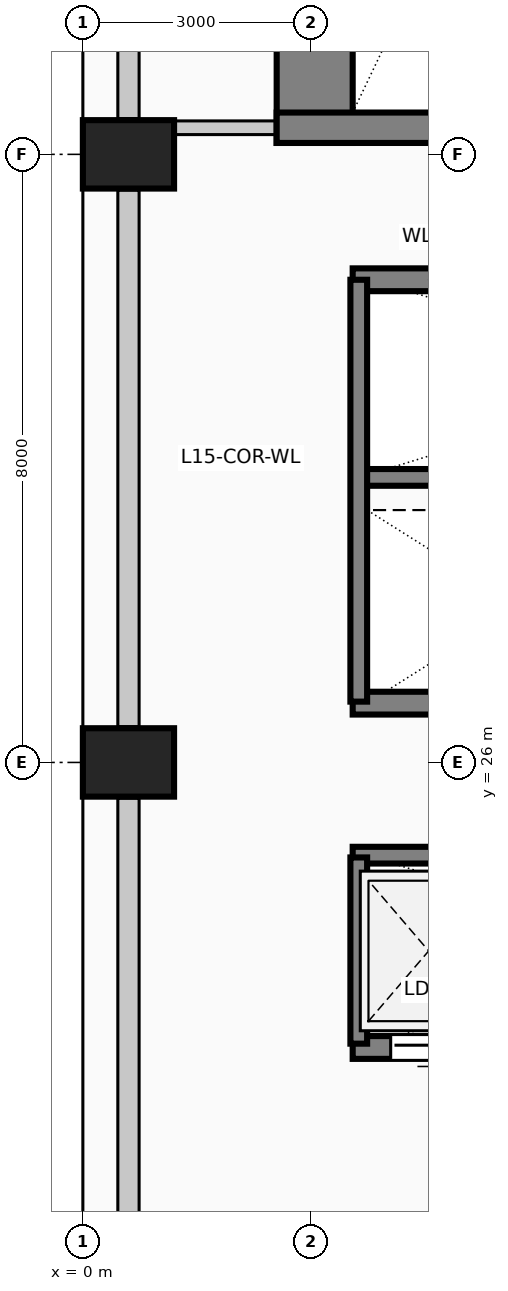
"""IFC4 building model, lengths in metres.
Left out: names, types, materials, properties, quantities, classifications, styles, units other than length and angle.
Written with IfcOpenShell. Run it as: python <this file> out.ifc"""

import sys

from ifc_helpers import new_model, si_unit, direction, frame, frame_2d, origin, origin_2d, place, context, subcontext, project, spatial, rectangle, extrude, element, fill, save


model = new_model("IFC4")
c1 = context("Model", 3, precision=1e-05, world=origin(), true_north=direction((0.0, 1.0)))
c2 = subcontext(c1, "Body", "Model", "MODEL_VIEW")
j1 = project(units=[si_unit("LENGTHUNIT", "METRE"), si_unit("PLANEANGLEUNIT", "RADIAN")], contexts=[c1])
p1 = place(None, origin())
s1 = spatial("IfcSite", under=j1, at=p1, CompositionType="ELEMENT")
p2 = place(p1, origin())
s2 = spatial("IfcBuilding", under=s1, at=p2, CompositionType="ELEMENT")
p3 = place(p2, frame((0.0, 0.0, 62.6)))
s3 = spatial("IfcBuildingStorey", under=s2, at=p3, CompositionType="ELEMENT", Elevation=62.6)
p4 = place(p3, frame((3.05, 34.15, 0.0), z_axis=(0.0, 0.0, 1.0), x_axis=(0.0, 1.0, 0.0)))
e1 = element("IfcWall", 1, at=p4, inside=s3, PredefinedType="SHEAR", context=c2, shape_type="SweptSolid", body=[
    extrude(rectangle(XDim=9.28, YDim=1.0, at=frame_2d((4.64, 0.0))), origin(), (0.0, 0.0, 1.0), 4.0),
])
p5 = place(p3, frame((2.55, 34.35, 0.0), z_axis=(0.0, 0.0, 1.0), x_axis=(1.0, 0.0, 0.0)))
e2 = element("IfcWall", 2, at=p5, inside=s3, PredefinedType="SHEAR", context=c2, shape_type="SweptSolid", body=[
    extrude(rectangle(XDim=5.16, YDim=0.4, at=frame_2d((2.58, 0.0))), origin(), (0.0, 0.0, 1.0), 4.0),
])
p6 = place(p5, frame((2.4, 0.0, 0.0)))
e3 = element("IfcOpeningElement", 3, at=p6, cuts=e2, PredefinedType="OPENING", context=c2, shape_type="SweptSolid", body=[
    extrude(rectangle(XDim=1.15, YDim=2.2, at=frame_2d((0.575, 1.1))), frame((0.0, 0.21, 0.0), z_axis=(0.0, -1.0, 0.0), x_axis=(1.0, 0.0, 0.0)), (0.0, 0.0, 1.0), 0.42),
])
for number, where, z_axis, x_axis in (
    (4, (0.6, 26.0, 0.0), (0.0, 0.0, 1.0), (0.0, 1.0, 0.0)),
    (5, (0.6, 34.0, 0.0), (0.0, 0.0, 1.0), (0.0, 1.0, 0.0)),
):
    element("IfcColumn", number, at=place(p3, frame(where, z_axis=z_axis, x_axis=x_axis)), inside=s3, PredefinedType="COLUMN", context=c2, shape_type="SweptSolid", body=[
        extrude(rectangle(XDim=0.9, YDim=1.2, at=origin_2d()), origin(), (0.0, 0.0, 1.0), 4.0),
    ])
for number, where, z_axis, x_axis in (
    (6, (0.6, 18.47, 0.0), (0.0, 0.0, 1.0), (0.0, 1.0, 0.0)),
    (7, (0.6, 26.47, 0.0), (0.0, 0.0, 1.0), (0.0, 1.0, 0.0)),
):
    element("IfcWall", number, at=place(p3, frame(where, z_axis=z_axis, x_axis=x_axis)), inside=s3, PredefinedType="SOLIDWALL", context=c2, shape_type="SweptSolid", body=[
        extrude(rectangle(XDim=7.06, YDim=0.28, at=frame_2d((3.53, 0.0))), origin(), (0.0, 0.0, 1.0), 2.85),
    ])
p7 = place(p3, frame((0.6, 34.47, 0.0), z_axis=(0.0, 0.0, 1.0), x_axis=(0.0, 1.0, 0.0)))
e8 = element("IfcWall", 8, at=p7, inside=s3, PredefinedType="SOLIDWALL", context=c2, shape_type="SweptSolid", body=[
    extrude(rectangle(XDim=7.46, YDim=0.28, at=frame_2d((3.73, 0.0))), origin(), (0.0, 0.0, 1.0), 2.85),
])
p8 = place(p3, frame((5.65, 22.25, 0.0), z_axis=(0.0, 0.0, 1.0), x_axis=(-1.0, 0.0, 0.0)))
e9 = element("IfcWall", 9, at=p8, inside=s3, PredefinedType="SOLIDWALL", context=c2, shape_type="SweptSolid", body=[
    extrude(rectangle(XDim=2.1, YDim=0.3, at=frame_2d((1.05, 0.0))), origin(), (0.0, 0.0, 1.0), 4.0),
])
p9 = place(p8, frame((0.5, 0.0, 0.0)))
e10 = element("IfcOpeningElement", 10, at=p9, cuts=e9, PredefinedType="OPENING", context=c2, shape_type="SweptSolid", body=[
    extrude(rectangle(XDim=1.1, YDim=2.2, at=frame_2d((0.55, 1.1))), frame((0.0, 0.16, 0.0), z_axis=(0.0, -1.0, 0.0), x_axis=(1.0, 0.0, 0.0)), (0.0, 0.0, 1.0), 0.32),
])
for number, where, z_axis, x_axis in (
    (11, (3.55, 32.35, 0.0), (0.0, 0.0, 1.0), (1.0, 0.0, 0.0)),
    (12, (5.65, 26.78, 0.0), (0.0, 0.0, 1.0), (-1.0, 0.0, 0.0)),
):
    element("IfcWall", number, at=place(p3, frame(where, z_axis=z_axis, x_axis=x_axis)), inside=s3, PredefinedType="SOLIDWALL", context=c2, shape_type="SweptSolid", body=[
        extrude(rectangle(XDim=2.1, YDim=0.3, at=frame_2d((1.05, 0.0))), origin(), (0.0, 0.0, 1.0), 4.0),
    ])
p10 = place(p3, frame((3.55, 29.75, 0.0), z_axis=(0.0, 0.0, 1.0), x_axis=(1.0, 0.0, 0.0)))
e13 = element("IfcWall", 13, at=p10, inside=s3, PredefinedType="SOLIDWALL", context=c2, shape_type="SweptSolid", body=[
    extrude(rectangle(XDim=8.65, YDim=0.22, at=frame_2d((4.325, 0.0))), origin(), (0.0, 0.0, 1.0), 4.0),
])
p11 = place(p3, frame((3.63, 26.8, 0.0), z_axis=(0.0, 0.0, 1.0), x_axis=(0.0, 1.0, 0.0)))
e14 = element("IfcWall", 14, at=p11, inside=s3, PredefinedType="SOLIDWALL", context=c2, shape_type="SweptSolid", body=[
    extrude(rectangle(XDim=5.55, YDim=0.22, at=frame_2d((2.775, 0.0))), origin(), (0.0, 0.0, 1.0), 4.0),
])
p12 = place(p3, frame((3.55, 24.78, 0.0), z_axis=(0.0, 0.0, 1.0), x_axis=(1.0, 0.0, 0.0)))
e15 = element("IfcWall", 15, at=p12, inside=s3, PredefinedType="SOLIDWALL", context=c2, shape_type="SweptSolid", body=[
    extrude(rectangle(XDim=8.65, YDim=0.22, at=frame_2d((4.325, 0.0))), origin(), (0.0, 0.0, 1.0), 4.0),
])
p13 = place(p3, frame((3.63, 22.3, 0.0), z_axis=(0.0, 0.0, 1.0), x_axis=(0.0, 1.0, 0.0)))
e16 = element("IfcWall", 16, at=p13, inside=s3, PredefinedType="SOLIDWALL", context=c2, shape_type="SweptSolid", body=[
    extrude(rectangle(XDim=2.45, YDim=0.22, at=frame_2d((1.225, 0.0))), origin(), (0.0, 0.0, 1.0), 4.0),
])
p14 = place(p3, frame((1.2, 34.35, 0.0), z_axis=(0.0, 0.0, 1.0), x_axis=(1.0, 0.0, 0.0)))
e17 = element("IfcWall", 17, at=p14, inside=s3, PredefinedType="PARTITIONING", context=c2, shape_type="SweptSolid", body=[
    extrude(rectangle(XDim=1.35, YDim=0.18, at=frame_2d((0.675, 0.0))), origin(), (0.0, 0.0, 1.0), 3.7),
])
p15 = place(p9, origin())
e18 = element("IfcDoor", 18, at=p15, inside=s3, OperationType="SLIDING_TO_LEFT", PredefinedType="DOOR", context=c2, shape_type="SweptSolid", body=[
    extrude(rectangle(XDim=1.1, YDim=2.2, at=frame_2d((0.55, 1.1))), frame((0.0, 0.025, 0.0), z_axis=(0.0, -1.0, 0.0), x_axis=(1.0, 0.0, 0.0)), (0.0, 0.0, 1.0), 0.05),
])
fill(e10, e18)
save(model, sys.argv[1])
